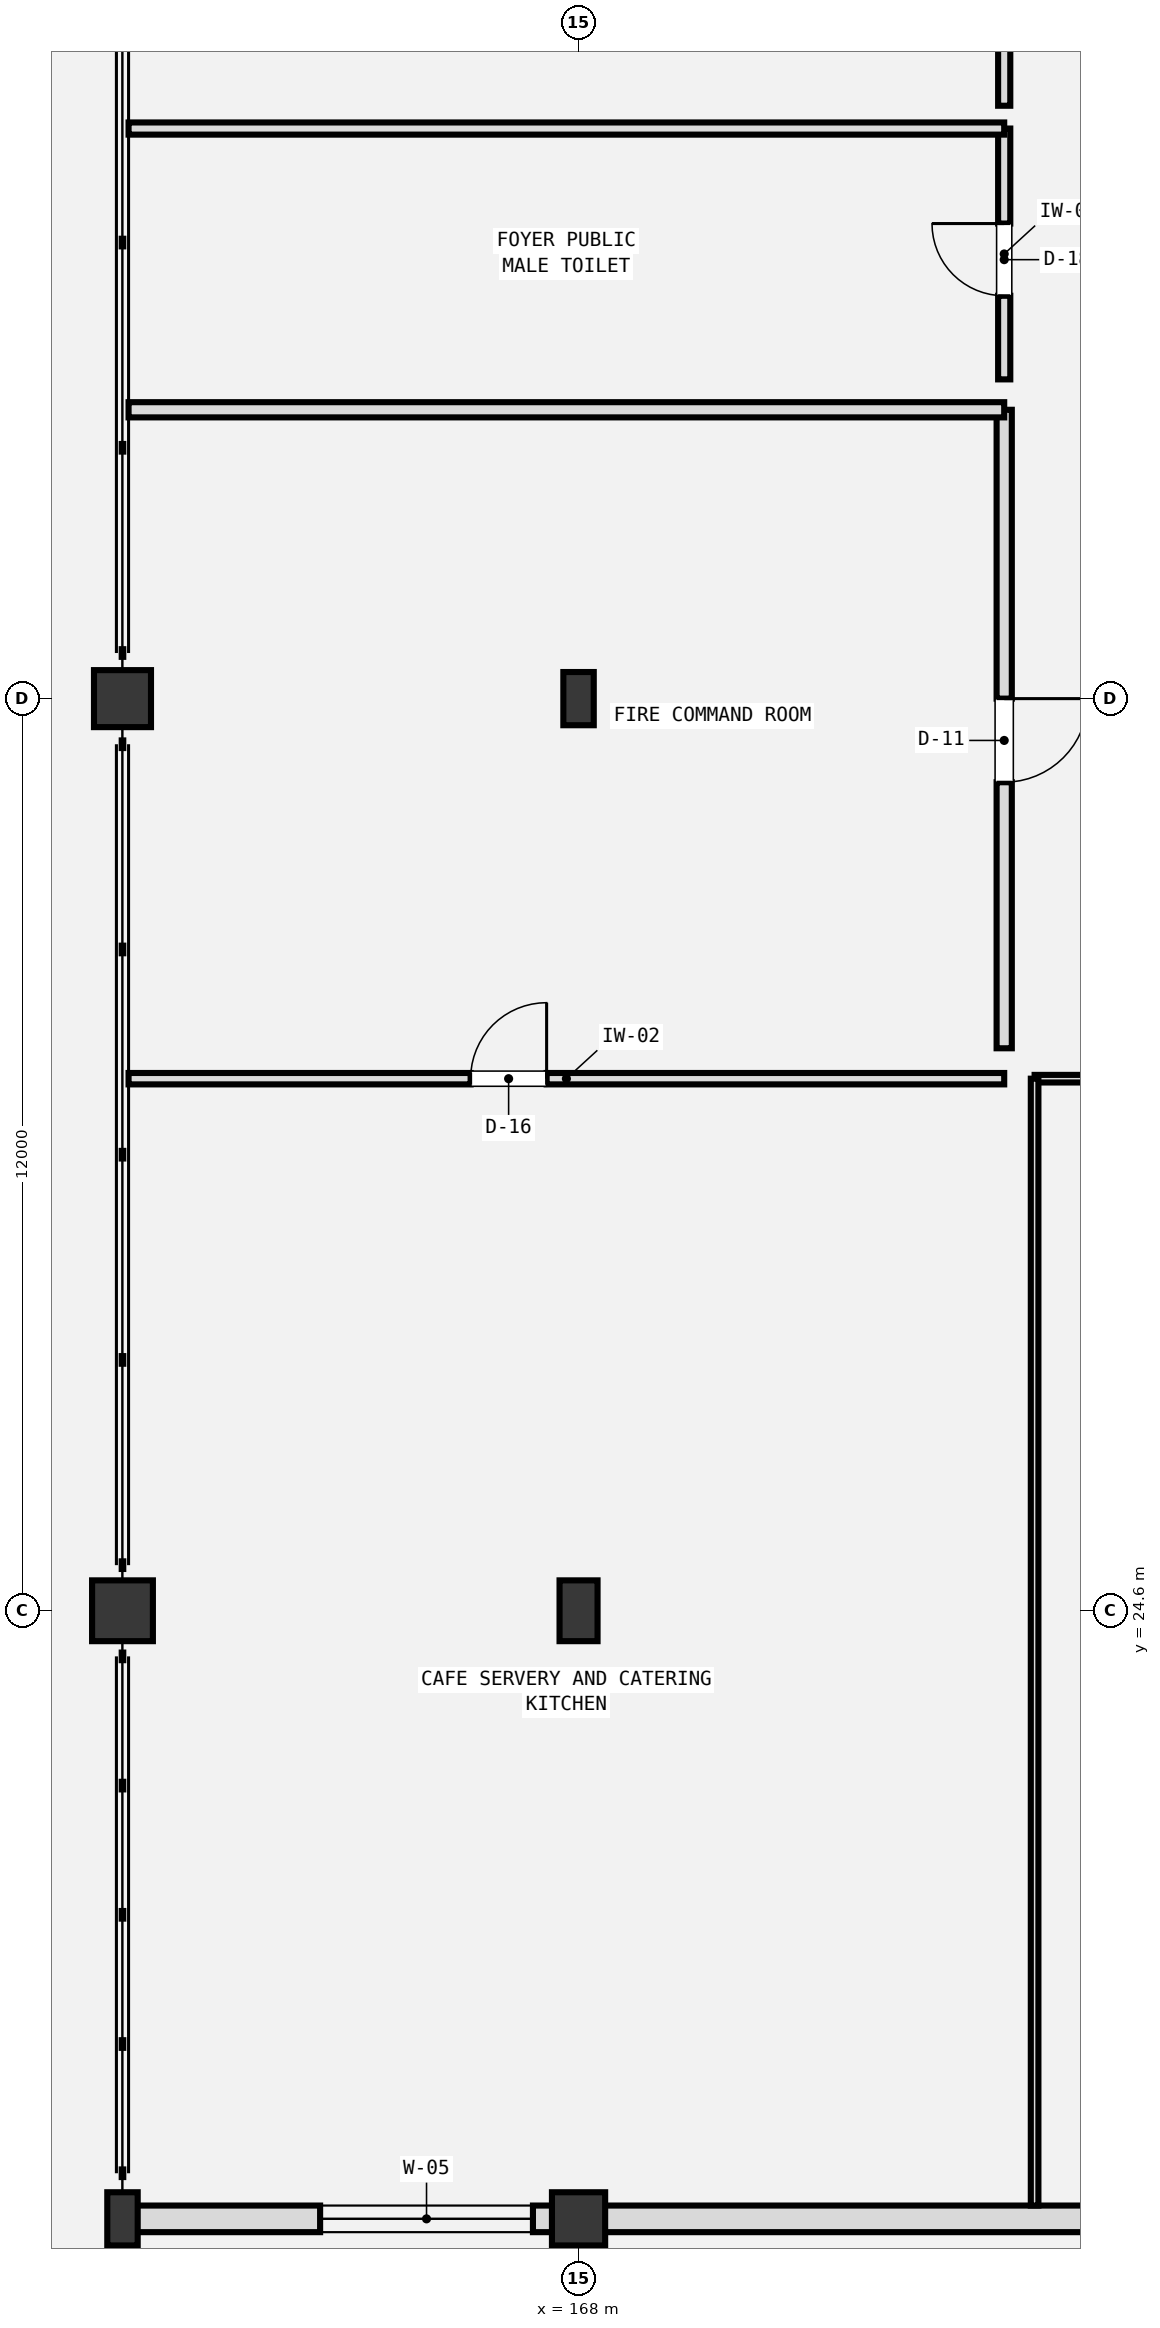
"""IFC4 building model, lengths in metres.
Left out: names, types, materials, properties, quantities, classifications, styles, units other than length and angle.
Written with IfcOpenShell. Run it as: python <this file> out.ifc"""

import sys

from ifc_helpers import new_model, si_unit, direction, frame, frame_2d, origin, origin_2d, place, context, subcontext, project, spatial, rectangle, extrude, element, fill, save


model = new_model("IFC4")
c1 = context("Model", 3, precision=1e-05, world=origin(), true_north=direction((0.0, 1.0)))
c2 = subcontext(c1, "Body", "Model", "MODEL_VIEW")
j1 = project(units=[si_unit("LENGTHUNIT", "METRE"), si_unit("PLANEANGLEUNIT", "RADIAN")], contexts=[c1])
p1 = place(None, origin())
s1 = spatial("IfcSite", under=j1, at=p1, CompositionType="ELEMENT")
p2 = place(p1, origin())
s2 = spatial("IfcBuilding", under=s1, at=p2, CompositionType="ELEMENT")
p3 = place(p2, origin())
s3 = spatial("IfcBuildingStorey", under=s2, at=p3, CompositionType="ELEMENT", Elevation=0.0)
p4 = place(p3, frame((162.0, 16.6, 0.0), z_axis=(0.0, 0.0, 1.0), x_axis=(1.0, 0.0, 0.0)))
e1 = element("IfcColumn", 1, at=p4, inside=s3, PredefinedType="PILASTER", context=c2, shape_type="SweptSolid", body=[
    extrude(rectangle(XDim=0.4, YDim=0.7, at=origin_2d()), origin(), (0.0, 0.0, 1.0), 5.14),
])
p5 = place(p3, frame((162.0, 24.6, 0.0), z_axis=(0.0, 0.0, 1.0), x_axis=(1.0, 0.0, 0.0)))
e2 = element("IfcColumn", 2, at=p5, inside=s3, PredefinedType="COLUMN", context=c2, shape_type="SweptSolid", body=[
    extrude(rectangle(XDim=0.8, YDim=0.8, at=origin_2d()), origin(), (0.0, 0.0, 1.0), 5.4),
])
p6 = place(p3, frame((162.0, 36.6, 0.0), z_axis=(0.0, 0.0, 1.0), x_axis=(1.0, 0.0, 0.0)))
e3 = element("IfcColumn", 3, at=p6, inside=s3, PredefinedType="COLUMN", context=c2, shape_type="SweptSolid", body=[
    extrude(rectangle(XDim=0.75, YDim=0.75, at=origin_2d()), origin(), (0.0, 0.0, 1.0), 5.4),
])
p7 = place(p3, frame((168.0, 16.6, 0.0), z_axis=(0.0, 0.0, 1.0), x_axis=(1.0, 0.0, 0.0)))
e4 = element("IfcColumn", 4, at=p7, inside=s3, PredefinedType="COLUMN", context=c2, shape_type="SweptSolid", body=[
    extrude(rectangle(XDim=0.7, YDim=0.7, at=origin_2d()), origin(), (0.0, 0.0, 1.0), 5.14),
])
p8 = place(p3, frame((168.0, 24.6, 0.0), z_axis=(0.0, 0.0, 1.0), x_axis=(1.0, 0.0, 0.0)))
e5 = element("IfcColumn", 5, at=p8, inside=s3, PredefinedType="COLUMN", context=c2, shape_type="SweptSolid", body=[
    extrude(rectangle(XDim=0.5, YDim=0.8, at=origin_2d()), origin(), (0.0, 0.0, 1.0), 5.4),
])
p9 = place(p3, frame((168.0, 36.6, 0.0), z_axis=(0.0, 0.0, 1.0), x_axis=(1.0, 0.0, 0.0)))
e6 = element("IfcColumn", 6, at=p9, inside=s3, PredefinedType="PILASTER", context=c2, shape_type="SweptSolid", body=[
    extrude(rectangle(XDim=0.4, YDim=0.7, at=origin_2d()), origin(), (0.0, 0.0, 1.0), 5.4),
])
p10 = place(p3, frame((162.0, 16.6, 0.0), z_axis=(0.0, 0.0, 1.0), x_axis=(1.0, 0.0, 0.0)))
e7 = element("IfcWall", 7, at=p10, inside=s3, PredefinedType="SOLIDWALL", context=c2, shape_type="SweptSolid", body=[
    extrude(rectangle(XDim=42.0, YDim=0.35, at=frame_2d((21.0, 0.0))), origin(), (0.0, 0.0, 1.0), 5.08),
])
p11 = place(p10, frame((15.5, 0.0, 0.0)))
e8 = element("IfcOpeningElement", 8, at=p11, cuts=e7, PredefinedType="OPENING", context=c2, shape_type="SweptSolid", body=[
    extrude(rectangle(XDim=2.0, YDim=2.4, at=frame_2d((1.0, 1.2))), frame((0.0, 0.185, 0.0), z_axis=(0.0, -1.0, 0.0), x_axis=(1.0, 0.0, 0.0)), (0.0, 0.0, 1.0), 0.37),
])
p12 = place(p10, frame((31.5, 0.0, 0.0)))
e9 = element("IfcOpeningElement", 9, at=p12, cuts=e7, PredefinedType="OPENING", context=c2, shape_type="SweptSolid", body=[
    extrude(rectangle(XDim=2.4, YDim=2.5, at=frame_2d((1.2, 1.25))), frame((0.0, 0.185, 0.0), z_axis=(0.0, -1.0, 0.0), x_axis=(1.0, 0.0, 0.0)), (0.0, 0.0, 1.0), 0.37),
])
p13 = place(p10, frame((2.6, 0.0, 0.85)))
e10 = element("IfcOpeningElement", 10, at=p13, cuts=e7, PredefinedType="OPENING", context=c2, shape_type="SweptSolid", body=[
    extrude(rectangle(XDim=2.8, YDim=1.2, at=frame_2d((1.4, 0.6))), frame((0.0, 0.185, 0.0), z_axis=(0.0, -1.0, 0.0), x_axis=(1.0, 0.0, 0.0)), (0.0, 0.0, 1.0), 0.37),
])
p14 = place(p10, frame((23.0, 0.0, 0.85)))
e11 = element("IfcOpeningElement", 11, at=p14, cuts=e7, PredefinedType="OPENING", context=c2, shape_type="SweptSolid", body=[
    extrude(rectangle(XDim=4.4, YDim=1.4, at=frame_2d((2.2, 0.7))), frame((0.0, 0.185, 0.0), z_axis=(0.0, -1.0, 0.0), x_axis=(1.0, 0.0, 0.0)), (0.0, 0.0, 1.0), 0.37),
])
p15 = place(p3, frame((174.0, 31.6, 0.0), z_axis=(0.0, 0.0, 1.0), x_axis=(1.0, 0.0, 0.0)))
e12 = element("IfcWall", 12, at=p15, inside=s3, PredefinedType="PARTITIONING", context=c2, shape_type="SweptSolid", body=[
    extrude(rectangle(XDim=29.4, YDim=0.1, at=frame_2d((14.7, 0.0))), origin(), (0.0, 0.0, 1.0), 3.9),
])
p16 = place(p15, frame((8.0, 0.0, 0.0)))
e13 = element("IfcOpeningElement", 13, at=p16, cuts=e12, PredefinedType="OPENING", context=c2, shape_type="SweptSolid", body=[
    extrude(rectangle(XDim=1.8, YDim=2.4, at=frame_2d((0.9, 1.2))), frame((0.0, 0.06, 0.0), z_axis=(0.0, -1.0, 0.0), x_axis=(1.0, 0.0, 0.0)), (0.0, 0.0, 1.0), 0.12),
])
p17 = place(p3, frame((174.0, 16.775, 0.0), z_axis=(0.0, 0.0, 1.0), x_axis=(0.0, 1.0, 0.0)))
e14 = element("IfcWall", 14, at=p17, inside=s3, PredefinedType="PARTITIONING", context=c2, shape_type="SweptSolid", body=[
    extrude(rectangle(XDim=14.825, YDim=0.1, at=frame_2d((7.413, 0.0))), origin(), (0.0, 0.0, 1.0), 3.9),
])
p18 = place(p3, frame((162.08, 31.6, 0.0), z_axis=(0.0, 0.0, 1.0), x_axis=(1.0, 0.0, 0.0)))
e15 = element("IfcWall", 15, at=p18, inside=s3, PredefinedType="PARTITIONING", context=c2, shape_type="SweptSolid", body=[
    extrude(rectangle(XDim=11.52, YDim=0.15, at=frame_2d((5.76, 0.0))), origin(), (0.0, 0.0, 1.0), 3.9),
])
p19 = place(p18, frame((4.5, 0.0, 0.0)))
e16 = element("IfcOpeningElement", 16, at=p19, cuts=e15, PredefinedType="OPENING", context=c2, shape_type="SweptSolid", body=[
    extrude(rectangle(XDim=1.0, YDim=2.2, at=frame_2d((0.5, 1.1))), frame((0.0, 0.085, 0.0), z_axis=(0.0, -1.0, 0.0), x_axis=(1.0, 0.0, 0.0)), (0.0, 0.0, 1.0), 0.17),
])
p20 = place(p3, frame((173.6, 32.0, 0.0), z_axis=(0.0, 0.0, 1.0), x_axis=(0.0, 1.0, 0.0)))
e17 = element("IfcWall", 17, at=p20, inside=s3, PredefinedType="SOLIDWALL", context=c2, shape_type="SweptSolid", body=[
    extrude(rectangle(XDim=8.4, YDim=0.2, at=frame_2d((4.2, 0.0))), origin(), (0.0, 0.0, 1.0), 3.9),
])
p21 = place(p20, frame((3.5, 0.0, 0.0)))
e18 = element("IfcOpeningElement", 18, at=p21, cuts=e17, PredefinedType="OPENING", context=c2, shape_type="SweptSolid", body=[
    extrude(rectangle(XDim=1.1, YDim=2.2, at=frame_2d((0.55, 1.1))), frame((0.0, 0.11, 0.0), z_axis=(0.0, -1.0, 0.0), x_axis=(1.0, 0.0, 0.0)), (0.0, 0.0, 1.0), 0.22),
])
p22 = place(p3, frame((162.08, 40.4, 0.0), z_axis=(0.0, 0.0, 1.0), x_axis=(1.0, 0.0, 0.0)))
e19 = element("IfcWall", 19, at=p22, inside=s3, PredefinedType="SOLIDWALL", context=c2, shape_type="SweptSolid", body=[
    extrude(rectangle(XDim=11.52, YDim=0.2, at=frame_2d((5.76, 0.0))), origin(), (0.0, 0.0, 1.0), 3.9),
])
p23 = place(p3, frame((173.6, 40.8, 0.0), z_axis=(0.0, 0.0, 1.0), x_axis=(0.0, 1.0, 0.0)))
e20 = element("IfcWall", 20, at=p23, inside=s3, PredefinedType="PLUMBINGWALL", context=c2, shape_type="SweptSolid", body=[
    extrude(rectangle(XDim=3.3, YDim=0.16, at=frame_2d((1.65, 0.0))), origin(), (0.0, 0.0, 1.0), 3.9),
])
p24 = place(p23, frame((1.1, 0.0, 0.0)))
e21 = element("IfcOpeningElement", 21, at=p24, cuts=e20, PredefinedType="OPENING", context=c2, shape_type="SweptSolid", body=[
    extrude(rectangle(XDim=0.95, YDim=2.15, at=frame_2d((0.475, 1.075))), frame((0.0, 0.09, 0.0), z_axis=(0.0, -1.0, 0.0), x_axis=(1.0, 0.0, 0.0)), (0.0, 0.0, 1.0), 0.18),
])
p25 = place(p3, frame((162.08, 44.1, 0.0), z_axis=(0.0, 0.0, 1.0), x_axis=(1.0, 0.0, 0.0)))
e22 = element("IfcWall", 22, at=p25, inside=s3, PredefinedType="PLUMBINGWALL", context=c2, shape_type="SweptSolid", body=[
    extrude(rectangle(XDim=11.52, YDim=0.16, at=frame_2d((5.76, 0.0))), origin(), (0.0, 0.0, 1.0), 3.9),
])
p26 = place(p3, frame((173.6, 44.4, 0.0), z_axis=(0.0, 0.0, 1.0), x_axis=(0.0, 1.0, 0.0)))
e23 = element("IfcWall", 23, at=p26, inside=s3, PredefinedType="PLUMBINGWALL", context=c2, shape_type="SweptSolid", body=[
    extrude(rectangle(XDim=3.3, YDim=0.16, at=frame_2d((1.65, 0.0))), origin(), (0.0, 0.0, 1.0), 3.9),
])
p27 = place(p26, frame((1.1, 0.0, 0.0)))
e24 = element("IfcOpeningElement", 24, at=p27, cuts=e23, PredefinedType="OPENING", context=c2, shape_type="SweptSolid", body=[
    extrude(rectangle(XDim=0.95, YDim=2.15, at=frame_2d((0.475, 1.075))), frame((0.0, 0.09, 0.0), z_axis=(0.0, -1.0, 0.0), x_axis=(1.0, 0.0, 0.0)), (0.0, 0.0, 1.0), 0.18),
])
p28 = place(p13, frame((2.8, 0.0, 0.0), z_axis=(0.0, 0.0, 1.0), x_axis=(-1.0, 0.0, 0.0)))
e25 = element("IfcWindow", 25, at=p28, inside=s3, PartitioningType="DOUBLE_PANEL_HORIZONTAL", PredefinedType="WINDOW", context=c2, shape_type="SweptSolid", body=[
    extrude(rectangle(XDim=2.8, YDim=1.2, at=frame_2d((1.4, 0.6))), frame((0.0, 0.03, 0.0), z_axis=(0.0, -1.0, 0.0), x_axis=(1.0, 0.0, 0.0)), (0.0, 0.0, 1.0), 0.06),
])
fill(e10, e25)
p29 = place(p19, origin())
e26 = element("IfcDoor", 26, at=p29, inside=s3, OperationType="SINGLE_SWING_RIGHT", PredefinedType="DOOR", context=c2, shape_type="SweptSolid", body=[
    extrude(rectangle(XDim=1.0, YDim=2.2, at=frame_2d((0.5, 1.1))), frame((0.0, 0.025, 0.0), z_axis=(0.0, -1.0, 0.0), x_axis=(1.0, 0.0, 0.0)), (0.0, 0.0, 1.0), 0.05),
])
fill(e16, e26)
p30 = place(p21, frame((1.1, 0.0, 0.0), z_axis=(0.0, 0.0, 1.0), x_axis=(-1.0, 0.0, 0.0)))
e27 = element("IfcDoor", 27, at=p30, inside=s3, OperationType="SINGLE_SWING_LEFT", PredefinedType="DOOR", context=c2, shape_type="SweptSolid", body=[
    extrude(rectangle(XDim=1.1, YDim=2.2, at=frame_2d((0.55, 1.1))), frame((0.0, 0.025, 0.0), z_axis=(0.0, -1.0, 0.0), x_axis=(1.0, 0.0, 0.0)), (0.0, 0.0, 1.0), 0.05),
])
fill(e18, e27)
p31 = place(p24, origin())
e28 = element("IfcDoor", 28, at=p31, inside=s3, OperationType="SINGLE_SWING_RIGHT", PredefinedType="DOOR", context=c2, shape_type="SweptSolid", body=[
    extrude(rectangle(XDim=0.95, YDim=2.15, at=frame_2d((0.475, 1.075))), frame((0.0, 0.025, 0.0), z_axis=(0.0, -1.0, 0.0), x_axis=(1.0, 0.0, 0.0)), (0.0, 0.0, 1.0), 0.05),
])
fill(e21, e28)
save(model, sys.argv[1])
